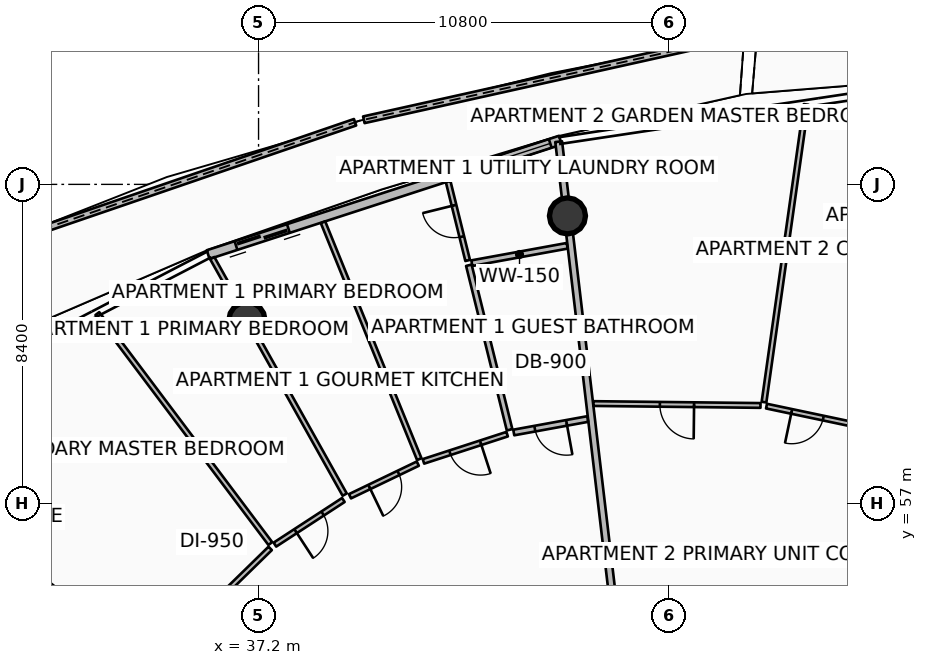
"""IFC4 building model, lengths in metres.
Left out: names, types, materials, properties, quantities, classifications, styles, units other than length and angle.
Written with IfcOpenShell. Run it as: python <this file> out.ifc"""

import sys

from ifc_helpers import new_model, si_unit, direction, frame, frame_2d, origin, origin_2d, place, context, subcontext, project, spatial, polyline, rectangle, circle, outline, extrude, element, fill, save


model = new_model("IFC4")
c1 = context("Model", 3, precision=1e-05, world=origin(), true_north=direction((0.0, 1.0)))
c2 = subcontext(c1, "Body", "Model", "MODEL_VIEW")
j1 = project(units=[si_unit("LENGTHUNIT", "METRE"), si_unit("PLANEANGLEUNIT", "RADIAN")], contexts=[c1])
p1 = place(None, origin())
s1 = spatial("IfcSite", under=j1, at=p1, CompositionType="ELEMENT")
p2 = place(p1, origin())
s2 = spatial("IfcBuilding", under=s1, at=p2, CompositionType="ELEMENT")
p3 = place(p2, frame((0.0, 0.0, 267.5)))
s3 = spatial("IfcBuildingStorey", under=s2, at=p3, CompositionType="ELEMENT", Elevation=267.5)
for number, where, z_axis, x_axis in (
    (1, (45.329, 64.571, 0.0), (0.0, 0.0, 1.0), (1.0, 0.0, 0.0)),
    (2, (36.895, 61.83, 0.0), (0.0, 0.0, 1.0), (1.0, 0.0, 0.0)),
):
    element("IfcColumn", number, at=place(p3, frame(where, z_axis=z_axis, x_axis=x_axis)), inside=s3, PredefinedType="COLUMN", context=c2, shape_type="SweptSolid", body=[
        extrude(circle(Radius=0.475, at=origin_2d()), origin(), (0.0, 0.0, 1.0), 3.59),
    ])
p4 = place(p3, frame((49.983, 69.327, 0.0), z_axis=(0.0, 0.0, 1.0), x_axis=(-0.976130464401, -0.217184982143, 0.0)))
e3 = element("IfcWall", 3, at=p4, inside=s3, PredefinedType="PARAPET", context=c2, shape_type="SweptSolid", body=[
    extrude(outline(polyline([(0.0, 0.0), (10.258, 0.0), (10.257, 1.348), (5.129, 1.182), (0.0, 1.12), (0.0, 0.0)])), frame((0.0, 0.09, 0.0), z_axis=(0.0, -1.0, 0.0), x_axis=(1.0, 0.0, 0.0)), (0.0, 0.0, 1.0), 0.18),
])
p5 = place(p3, frame((39.74, 67.034, 0.0), z_axis=(0.0, 0.0, 1.0), x_axis=(-0.945994037051, -0.32418402469, 0.0)))
e4 = element("IfcWall", 4, at=p5, inside=s3, PredefinedType="PARAPET", context=c2, shape_type="SweptSolid", body=[
    extrude(outline(polyline([(0.0, 0.0), (10.544, 0.0), (10.544, 1.747), (5.272, 1.562), (0.0, 1.348), (0.0, 0.0)])), frame((0.0, 0.09, 0.0), z_axis=(0.0, -1.0, 0.0), x_axis=(1.0, 0.0, 0.0)), (0.0, 0.0, 1.0), 0.18),
])
p6 = place(p3, frame((45.142, 66.564, 0.0), z_axis=(0.0, 0.0, 1.0), x_axis=(-0.951055974609, -0.309018661507, 0.0)))
e5 = element("IfcWall", 5, at=p6, inside=s3, PredefinedType="SOLIDWALL", context=c2, shape_type="SweptSolid", body=[
    extrude(rectangle(XDim=9.745, YDim=0.24, at=frame_2d((4.873, 0.0))), origin(), (0.0, 0.0, 1.0), 2.54),
])
p7 = place(p6, frame((7.525, 0.0, 0.0)))
e6 = element("IfcOpeningElement", 6, at=p7, cuts=e5, PredefinedType="OPENING", context=c2, shape_type="SweptSolid", body=[
    extrude(rectangle(XDim=1.45, YDim=2.15, at=frame_2d((0.725, 1.075))), frame((0.0, 0.13, 0.0), z_axis=(0.0, -1.0, 0.0), x_axis=(1.0, 0.0, 0.0)), (0.0, 0.0, 1.0), 0.26),
])
p8 = place(p6, frame((0.28, 0.0, 0.65)))
e7 = element("IfcOpeningElement", 7, at=p8, cuts=e5, PredefinedType="OPENING", context=c2, shape_type="SweptSolid", body=[
    extrude(rectangle(XDim=1.6, YDim=1.5, at=frame_2d((0.8, 0.75))), frame((0.0, 0.13, 0.0), z_axis=(0.0, -1.0, 0.0), x_axis=(1.0, 0.0, 0.0)), (0.0, 0.0, 1.0), 0.26),
])
p9 = place(p3, frame((46.75, 52.559, 0.0), z_axis=(0.0, 0.0, 1.0), x_axis=(-0.117540318076, 0.993068111273, 0.0)))
e8 = element("IfcWall", 8, at=p9, inside=s3, PredefinedType="PARTITIONING", context=c2, shape_type="SweptSolid", body=[
    extrude(rectangle(XDim=14.062, YDim=0.18, at=frame_2d((7.031, 0.0))), origin(), (0.0, 0.0, 1.0), 2.957),
])
p10 = place(p3, frame((45.861, 59.226, 0.0), z_axis=(0.0, 0.0, 1.0), x_axis=(-0.983812554945, -0.179200604723, 0.0)))
e9 = element("IfcWall", 9, at=p10, inside=s3, PredefinedType="PARTITIONING", context=c2, shape_type="SweptSolid", body=[
    extrude(rectangle(XDim=1.977, YDim=0.15, at=frame_2d((0.988, 0.0))), origin(), (0.0, 0.0, 1.0), 2.957),
])
p11 = place(p10, frame((0.563, 0.0, 0.0)))
e10 = element("IfcOpeningElement", 10, at=p11, cuts=e9, PredefinedType="OPENING", context=c2, shape_type="SweptSolid", body=[
    extrude(rectangle(XDim=0.85, YDim=2.06, at=frame_2d((0.425, 1.03))), frame((0.0, 0.085, 0.0), z_axis=(0.0, -1.0, 0.0), x_axis=(1.0, 0.0, 0.0)), (0.0, 0.0, 1.0), 0.17),
])
p12 = place(p3, frame((45.321, 63.784, 0.0), z_axis=(0.0, 0.0, 1.0), x_axis=(-0.983788616277, -0.179331978422, 0.0)))
e11 = element("IfcWall", 11, at=p12, inside=s3, PredefinedType="PARTITIONING", context=c2, shape_type="SweptSolid", body=[
    extrude(rectangle(XDim=2.55, YDim=0.15, at=frame_2d((1.275, 0.0))), origin(), (0.0, 0.0, 1.0), 2.957),
])
p13 = place(p3, frame((43.806, 58.943, 0.0), z_axis=(0.0, 0.0, 1.0), x_axis=(-0.240319531841, 0.970693835674, 0.0)))
e12 = element("IfcWall", 12, at=p13, inside=s3, PredefinedType="PARTITIONING", context=c2, shape_type="SweptSolid", body=[
    extrude(rectangle(XDim=4.46, YDim=0.15, at=frame_2d((2.23, 0.0))), origin(), (0.0, 0.0, 1.0), 3.03),
])
p14 = place(p3, frame((42.703, 63.398, 0.0), z_axis=(0.0, 0.0, 1.0), x_axis=(-0.240385432392, 0.970677517971, 0.0)))
e13 = element("IfcWall", 13, at=p14, inside=s3, PredefinedType="PARTITIONING", context=c2, shape_type="SweptSolid", body=[
    extrude(rectangle(XDim=2.138, YDim=0.125, at=frame_2d((1.069, 0.0))), origin(), (0.0, 0.0, 1.0), 3.03),
])
p15 = place(p14, frame((0.644, 0.0, 0.0)))
e14 = element("IfcOpeningElement", 14, at=p15, cuts=e13, PredefinedType="OPENING", context=c2, shape_type="SweptSolid", body=[
    extrude(rectangle(XDim=0.85, YDim=2.06, at=frame_2d((0.425, 1.03))), frame((0.0, 0.073, 0.0), z_axis=(0.0, -1.0, 0.0), x_axis=(1.0, 0.0, 0.0)), (0.0, 0.0, 1.0), 0.145),
])
p16 = place(p3, frame((41.429, 58.17, 0.0), z_axis=(0.0, 0.0, 1.0), x_axis=(-0.376458801215, 0.926433360252, 0.0)))
e15 = element("IfcWall", 15, at=p16, inside=s3, PredefinedType="PARTITIONING", context=c2, shape_type="SweptSolid", body=[
    extrude(rectangle(XDim=6.728, YDim=0.125, at=frame_2d((3.364, 0.0))), origin(), (0.0, 0.0, 1.0), 3.03),
])
p17 = place(p3, frame((43.742, 58.827, 0.0), z_axis=(0.0, 0.0, 1.0), x_axis=(-0.950997650668, -0.309198105466, 0.0)))
e16 = element("IfcWall", 16, at=p17, inside=s3, PredefinedType="PARTITIONING", context=c2, shape_type="SweptSolid", body=[
    extrude(rectangle(XDim=2.316, YDim=0.125, at=frame_2d((1.158, 0.0))), origin(), (0.0, 0.0, 1.0), 3.03),
])
p18 = place(p17, frame((0.733, 0.0, 0.0)))
e17 = element("IfcOpeningElement", 17, at=p18, cuts=e16, PredefinedType="OPENING", context=c2, shape_type="SweptSolid", body=[
    extrude(rectangle(XDim=0.85, YDim=2.06, at=frame_2d((0.425, 1.03))), frame((0.0, 0.073, 0.0), z_axis=(0.0, -1.0, 0.0), x_axis=(1.0, 0.0, 0.0)), (0.0, 0.0, 1.0), 0.145),
])
p19 = place(p3, frame((41.391, 58.052, 0.0), z_axis=(0.0, 0.0, 1.0), x_axis=(-0.901197816095, -0.433408002079, 0.0)))
e18 = element("IfcWall", 18, at=p19, inside=s3, PredefinedType="PARTITIONING", context=c2, shape_type="SweptSolid", body=[
    extrude(rectangle(XDim=1.981, YDim=0.125, at=frame_2d((0.991, 0.0))), origin(), (0.0, 0.0, 1.0), 2.957),
])
p20 = place(p19, frame((0.565, 0.0, 0.0)))
e19 = element("IfcOpeningElement", 19, at=p20, cuts=e18, PredefinedType="OPENING", context=c2, shape_type="SweptSolid", body=[
    extrude(rectangle(XDim=0.85, YDim=2.06, at=frame_2d((0.425, 1.03))), frame((0.0, 0.073, 0.0), z_axis=(0.0, -1.0, 0.0), x_axis=(1.0, 0.0, 0.0)), (0.0, 0.0, 1.0), 0.145),
])
p21 = place(p3, frame((39.467, 57.237, 0.0), z_axis=(0.0, 0.0, 1.0), x_axis=(-0.488642985948, 0.872483829239, 0.0)))
e20 = element("IfcWall", 20, at=p21, inside=s3, PredefinedType="PARTITIONING", context=c2, shape_type="SweptSolid", body=[
    extrude(rectangle(XDim=7.131, YDim=0.125, at=frame_2d((3.565, 0.0))), origin(), (0.0, 0.0, 1.0), 2.957),
])
p22 = place(p3, frame((37.509, 55.949, 0.0), z_axis=(0.0, 0.0, 1.0), x_axis=(-0.60104674722, 0.799213868534, 0.0)))
e21 = element("IfcWall", 21, at=p22, inside=s3, PredefinedType="PARTITIONING", context=c2, shape_type="SweptSolid", body=[
    extrude(rectangle(XDim=7.572, YDim=0.125, at=frame_2d((3.786, 0.0))), origin(), (0.0, 0.0, 1.0), 3.03),
])
p23 = place(p3, frame((39.432, 57.095, 0.0), z_axis=(0.0, 0.0, 1.0), x_axis=(-0.837734795217, -0.546077295703, 0.0)))
e22 = element("IfcWall", 22, at=p23, inside=s3, PredefinedType="PARTITIONING", context=c2, shape_type="SweptSolid", body=[
    extrude(rectangle(XDim=2.15, YDim=0.125, at=frame_2d((1.075, 0.0))), origin(), (0.0, 0.0, 1.0), 2.957),
])
p24 = place(p23, frame((0.65, 0.0, 0.0)))
e23 = element("IfcOpeningElement", 23, at=p24, cuts=e22, PredefinedType="OPENING", context=c2, shape_type="SweptSolid", body=[
    extrude(rectangle(XDim=0.85, YDim=2.06, at=frame_2d((0.425, 1.03))), frame((0.0, 0.073, 0.0), z_axis=(0.0, -1.0, 0.0), x_axis=(1.0, 0.0, 0.0)), (0.0, 0.0, 1.0), 0.145),
])
p25 = place(p3, frame((37.506, 55.822, 0.0), z_axis=(0.0, 0.0, 1.0), x_axis=(-0.715105814901, -0.699016218334, 0.0)))
e24 = element("IfcWall", 24, at=p25, inside=s3, PredefinedType="PARTITIONING", context=c2, shape_type="SweptSolid", body=[
    extrude(rectangle(XDim=4.294, YDim=0.125, at=frame_2d((2.147, 0.0))), origin(), (0.0, 0.0, 1.0), 2.957),
])
p26 = place(p25, frame((1.697, 0.0, 0.0)))
e25 = element("IfcOpeningElement", 25, at=p26, cuts=e24, PredefinedType="OPENING", context=c2, shape_type="SweptSolid", body=[
    extrude(rectangle(XDim=0.9, YDim=2.08, at=frame_2d((0.45, 1.04))), frame((0.0, 0.073, 0.0), z_axis=(0.0, -1.0, 0.0), x_axis=(1.0, 0.0, 0.0)), (0.0, 0.0, 1.0), 0.145),
])
p27 = place(p3, frame((34.285, 52.812, 0.0), z_axis=(0.0, 0.0, 1.0), x_axis=(-0.785324921183, 0.619083813526, 0.0)))
e26 = element("IfcWall", 26, at=p27, inside=s3, PredefinedType="PARTITIONING", context=c2, shape_type="SweptSolid", body=[
    extrude(rectangle(XDim=9.621, YDim=0.125, at=frame_2d((4.811, 0.0))), origin(), (0.0, 0.0, 1.0), 2.957),
])
p28 = place(p3, frame((50.501, 59.671, 0.0), z_axis=(0.0, 0.0, 1.0), x_axis=(0.140142335256, 0.990131367986, 0.0)))
e27 = element("IfcWall", 27, at=p28, inside=s3, PredefinedType="PARTITIONING", context=c2, shape_type="SweptSolid", body=[
    extrude(rectangle(XDim=7.911, YDim=0.125, at=frame_2d((3.956, 0.0))), origin(), (0.0, 0.0, 1.0), 3.03),
])
p29 = place(p3, frame((52.722, 59.111, 0.0), z_axis=(0.0, 0.0, 1.0), x_axis=(-0.978503905914, 0.206228286399, 0.0)))
e28 = element("IfcWall", 28, at=p29, inside=s3, PredefinedType="PARTITIONING", context=c2, shape_type="SweptSolid", body=[
    extrude(rectangle(XDim=2.203, YDim=0.125, at=frame_2d((1.102, 0.0))), origin(), (0.0, 0.0, 1.0), 2.957),
])
p30 = place(p29, frame((0.677, 0.0, 0.0)))
e29 = element("IfcOpeningElement", 29, at=p30, cuts=e28, PredefinedType="OPENING", context=c2, shape_type="SweptSolid", body=[
    extrude(rectangle(XDim=0.85, YDim=2.06, at=frame_2d((0.425, 1.03))), frame((0.0, 0.073, 0.0), z_axis=(0.0, -1.0, 0.0), x_axis=(1.0, 0.0, 0.0)), (0.0, 0.0, 1.0), 0.145),
])
p31 = place(p3, frame((50.408, 59.583, 0.0), z_axis=(0.0, 0.0, 1.0), x_axis=(-0.999935174521, 0.01138625289, 0.0)))
e30 = element("IfcWall", 30, at=p31, inside=s3, PredefinedType="PARTITIONING", context=c2, shape_type="SweptSolid", body=[
    extrude(rectangle(XDim=4.396, YDim=0.125, at=frame_2d((2.198, 0.0))), origin(), (0.0, 0.0, 1.0), 3.03),
])
p32 = place(p31, frame((1.748, 0.0, 0.0)))
e31 = element("IfcOpeningElement", 31, at=p32, cuts=e30, PredefinedType="OPENING", context=c2, shape_type="SweptSolid", body=[
    extrude(rectangle(XDim=0.9, YDim=2.08, at=frame_2d((0.45, 1.04))), frame((0.0, 0.073, 0.0), z_axis=(0.0, -1.0, 0.0), x_axis=(1.0, 0.0, 0.0)), (0.0, 0.0, 1.0), 0.145),
])
p33 = place(p7, origin())
e32 = element("IfcDoor", 32, at=p33, inside=s3, OperationType="DOUBLE_DOOR_SLIDING", PredefinedType="DOOR", context=c2, shape_type="SweptSolid", body=[
    extrude(rectangle(XDim=1.45, YDim=2.15, at=frame_2d((0.725, 1.075))), frame((0.0, 0.025, 0.0), z_axis=(0.0, -1.0, 0.0), x_axis=(1.0, 0.0, 0.0)), (0.0, 0.0, 1.0), 0.05),
])
fill(e6, e32)
p34 = place(p8, origin())
e33 = element("IfcWindow", 33, at=p34, inside=s3, PartitioningType="SINGLE_PANEL", PredefinedType="WINDOW", context=c2, shape_type="SweptSolid", body=[
    extrude(rectangle(XDim=1.6, YDim=1.5, at=frame_2d((0.8, 0.75))), frame((0.0, 0.03, 0.0), z_axis=(0.0, -1.0, 0.0), x_axis=(1.0, 0.0, 0.0)), (0.0, 0.0, 1.0), 0.06),
])
fill(e7, e33)
p35 = place(p11, origin())
e34 = element("IfcDoor", 34, at=p35, inside=s3, OperationType="SINGLE_SWING_LEFT", PredefinedType="DOOR", context=c2, shape_type="SweptSolid", body=[
    extrude(rectangle(XDim=0.85, YDim=2.06, at=frame_2d((0.425, 1.03))), frame((0.0, 0.025, 0.0), z_axis=(0.0, -1.0, 0.0), x_axis=(1.0, 0.0, 0.0)), (0.0, 0.0, 1.0), 0.05),
])
fill(e10, e34)
p36 = place(p15, origin())
e35 = element("IfcDoor", 35, at=p36, inside=s3, OperationType="SINGLE_SWING_RIGHT", PredefinedType="DOOR", context=c2, shape_type="SweptSolid", body=[
    extrude(rectangle(XDim=0.85, YDim=2.06, at=frame_2d((0.425, 1.03))), frame((0.0, 0.025, 0.0), z_axis=(0.0, -1.0, 0.0), x_axis=(1.0, 0.0, 0.0)), (0.0, 0.0, 1.0), 0.05),
])
fill(e14, e35)
p37 = place(p18, origin())
e36 = element("IfcDoor", 36, at=p37, inside=s3, OperationType="SINGLE_SWING_LEFT", PredefinedType="DOOR", context=c2, shape_type="SweptSolid", body=[
    extrude(rectangle(XDim=0.85, YDim=2.06, at=frame_2d((0.425, 1.03))), frame((0.0, 0.025, 0.0), z_axis=(0.0, -1.0, 0.0), x_axis=(1.0, 0.0, 0.0)), (0.0, 0.0, 1.0), 0.05),
])
fill(e17, e36)
p38 = place(p20, origin())
e37 = element("IfcDoor", 37, at=p38, inside=s3, OperationType="SINGLE_SWING_RIGHT", PredefinedType="DOOR", context=c2, shape_type="SweptSolid", body=[
    extrude(rectangle(XDim=0.85, YDim=2.06, at=frame_2d((0.425, 1.03))), frame((0.0, 0.025, 0.0), z_axis=(0.0, -1.0, 0.0), x_axis=(1.0, 0.0, 0.0)), (0.0, 0.0, 1.0), 0.05),
])
fill(e19, e37)
p39 = place(p24, origin())
e38 = element("IfcDoor", 38, at=p39, inside=s3, OperationType="SINGLE_SWING_RIGHT", PredefinedType="DOOR", context=c2, shape_type="SweptSolid", body=[
    extrude(rectangle(XDim=0.85, YDim=2.06, at=frame_2d((0.425, 1.03))), frame((0.0, 0.025, 0.0), z_axis=(0.0, -1.0, 0.0), x_axis=(1.0, 0.0, 0.0)), (0.0, 0.0, 1.0), 0.05),
])
fill(e23, e38)
p40 = place(p30, origin())
e39 = element("IfcDoor", 39, at=p40, inside=s3, OperationType="SINGLE_SWING_RIGHT", PredefinedType="DOOR", context=c2, shape_type="SweptSolid", body=[
    extrude(rectangle(XDim=0.85, YDim=2.06, at=frame_2d((0.425, 1.03))), frame((0.0, 0.025, 0.0), z_axis=(0.0, -1.0, 0.0), x_axis=(1.0, 0.0, 0.0)), (0.0, 0.0, 1.0), 0.05),
])
fill(e29, e39)
p41 = place(p32, origin())
e40 = element("IfcDoor", 40, at=p41, inside=s3, OperationType="SINGLE_SWING_LEFT", PredefinedType="DOOR", context=c2, shape_type="SweptSolid", body=[
    extrude(rectangle(XDim=0.9, YDim=2.08, at=frame_2d((0.45, 1.04))), frame((0.0, 0.025, 0.0), z_axis=(0.0, -1.0, 0.0), x_axis=(1.0, 0.0, 0.0)), (0.0, 0.0, 1.0), 0.05),
])
fill(e31, e40)
save(model, sys.argv[1])
